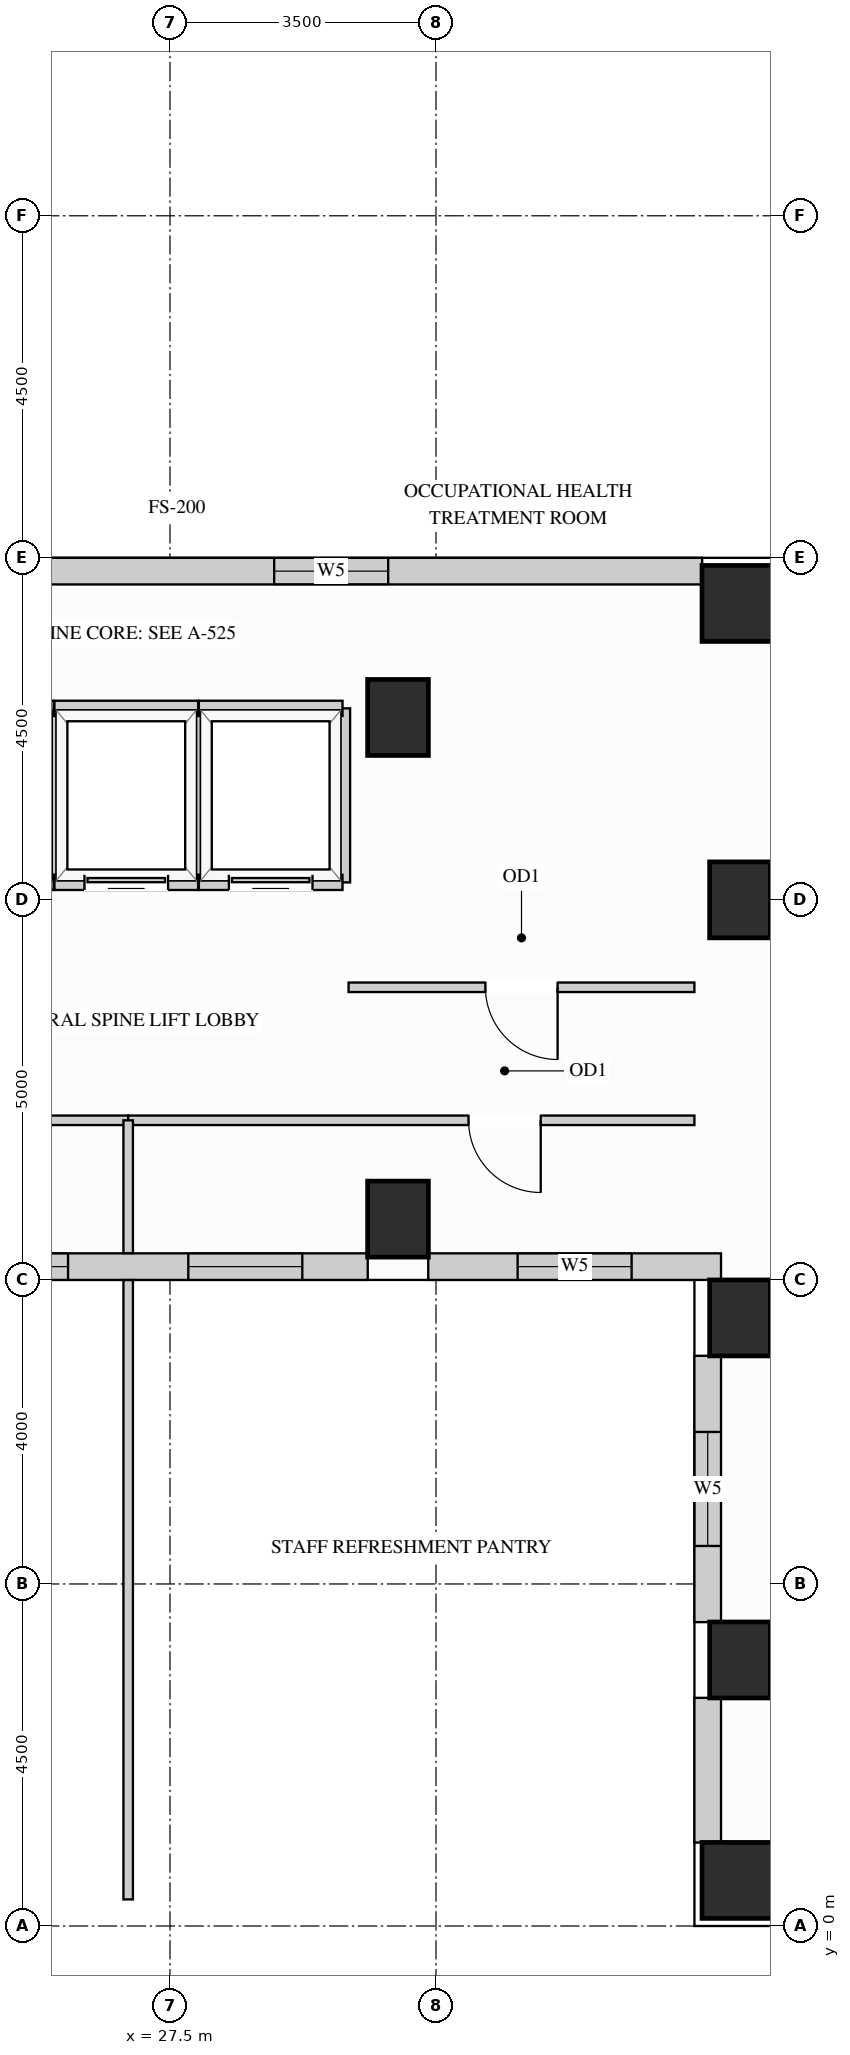
"""IFC4 building model, lengths in metres.
Left out: names, types, materials, properties, quantities, classifications, styles, units other than length and angle.
Written with IfcOpenShell. Run it as: python <this file> out.ifc"""

import sys

from ifc_helpers import new_model, si_unit, direction, frame, frame_2d, origin, origin_2d, place, context, subcontext, project, spatial, rectangle, extrude, source, transform, mapped, element, fill, save


model = new_model("IFC4")
c1 = context("Model", 3, precision=1e-05, world=origin(), true_north=direction((0.0, 1.0)))
c2 = subcontext(c1, "Body", "Model", "MODEL_VIEW")
j1 = project(units=[si_unit("LENGTHUNIT", "METRE"), si_unit("PLANEANGLEUNIT", "RADIAN")], contexts=[c1])
p1 = place(None, origin())
s1 = spatial("IfcSite", under=j1, at=p1, CompositionType="ELEMENT")
p2 = place(p1, origin())
s2 = spatial("IfcBuilding", under=s1, at=p2, CompositionType="ELEMENT")
p3 = place(p2, frame((0.0, 0.0, 157.5)))
s3 = spatial("IfcBuildingStorey", under=s2, at=p3, CompositionType="ELEMENT", Elevation=157.5)
m1 = source(origin(), c2, "Body", "SweptSolid", [
    extrude(rectangle(XDim=0.8, YDim=1.0, at=origin_2d()), origin(), (0.0, 0.0, 1.0), 3.4),
])
for number, where, z_axis, x_axis in (
    (1, (35.0, 13.5, 0.0), (0.0, 0.0, 1.0), (1.0, 0.0, 0.0)),
    (2, (35.0, 3.5, 0.0), (0.0, 0.0, 1.0), (1.0, 0.0, 0.0)),
    (3, (35.0, 8.0, 0.0), (0.0, 0.0, 1.0), (1.0, 0.0, 0.0)),
    (4, (30.5, 15.9, 0.0), (0.0, 0.0, 1.0), (1.0, 0.0, 0.0)),
    (5, (30.5, 9.3, 0.0), (0.0, 0.0, 1.0), (1.0, 0.0, 0.0)),
):
    element("IfcColumn", number, at=place(p3, frame(where, z_axis=z_axis, x_axis=x_axis)), inside=s3, PredefinedType="COLUMN", context=c2, shape_type="MappedRepresentation", body=[
        mapped(m1, transform((0.0, 0.0, 0.0), x_axis=(1.0, 0.0, 0.0), y_axis=(0.0, 1.0, 0.0), z_axis=(0.0, 0.0, 1.0))),
    ])
m2 = source(origin(), c2, "Body", "SweptSolid", [
    extrude(rectangle(XDim=1.0, YDim=1.0, at=origin_2d()), origin(), (0.0, 0.0, 1.0), 3.4),
])
for number, where, z_axis, x_axis in (
    (6, (35.0, 17.4, 0.0), (0.0, 0.0, 1.0), (1.0, 0.0, 0.0)),
    (7, (35.0, 0.6, 0.0), (0.0, 0.0, 1.0), (1.0, 0.0, 0.0)),
):
    element("IfcColumn", number, at=place(p3, frame(where, z_axis=z_axis, x_axis=x_axis)), inside=s3, PredefinedType="COLUMN", context=c2, shape_type="MappedRepresentation", body=[
        mapped(m2, transform((0.0, 0.0, 0.0), x_axis=(1.0, 0.0, 0.0), y_axis=(0.0, 1.0, 0.0), z_axis=(0.0, 0.0, 1.0))),
    ])
p4 = place(p3, frame((23.798, 8.675, 0.0), z_axis=(0.0, 0.0, 1.0), x_axis=(1.0, 0.0, 0.0)))
e8 = element("IfcWall", 8, at=p4, inside=s3, PredefinedType="SOLIDWALL", context=c2, shape_type="SweptSolid", body=[
    extrude(rectangle(XDim=6.304, YDim=0.35, at=frame_2d((3.152, 0.0))), origin(), (0.0, 0.0, 1.0), 3.385),
])
p5 = place(p4, frame((0.861, 0.0, 0.78)))
e9 = element("IfcOpeningElement", 9, at=p5, cuts=e8, PredefinedType="OPENING", context=c2, shape_type="SweptSolid", body=[
    extrude(rectangle(XDim=1.5, YDim=2.0, at=frame_2d((0.75, 1.0))), frame((0.0, 0.185, 0.0), z_axis=(0.0, -1.0, 0.0), x_axis=(1.0, 0.0, 0.0)), (0.0, 0.0, 1.0), 0.37),
])
p6 = place(p4, frame((3.943, 0.0, 0.78)))
e10 = element("IfcOpeningElement", 10, at=p6, cuts=e8, PredefinedType="OPENING", context=c2, shape_type="SweptSolid", body=[
    extrude(rectangle(XDim=1.5, YDim=2.0, at=frame_2d((0.75, 1.0))), frame((0.0, 0.185, 0.0), z_axis=(0.0, -1.0, 0.0), x_axis=(1.0, 0.0, 0.0)), (0.0, 0.0, 1.0), 0.37),
])
p7 = place(p3, frame((30.898, 8.675, 0.0), z_axis=(0.0, 0.0, 1.0), x_axis=(1.0, 0.0, 0.0)))
e11 = element("IfcWall", 11, at=p7, inside=s3, PredefinedType="SOLIDWALL", context=c2, shape_type="SweptSolid", body=[
    extrude(rectangle(XDim=3.852, YDim=0.35, at=frame_2d((1.926, 0.0))), origin(), (0.0, 0.0, 1.0), 3.385),
])
p8 = place(p7, frame((1.176, 0.0, 0.78)))
e12 = element("IfcOpeningElement", 12, at=p8, cuts=e11, PredefinedType="OPENING", context=c2, shape_type="SweptSolid", body=[
    extrude(rectangle(XDim=1.5, YDim=2.0, at=frame_2d((0.75, 1.0))), frame((0.0, 0.185, 0.0), z_axis=(0.0, -1.0, 0.0), x_axis=(1.0, 0.0, 0.0)), (0.0, 0.0, 1.0), 0.37),
])
p9 = place(p3, frame((34.575, 7.502, 0.0), z_axis=(0.0, 0.0, 1.0), x_axis=(0.0, -1.0, 0.0)))
e13 = element("IfcWall", 13, at=p9, inside=s3, PredefinedType="SOLIDWALL", context=c2, shape_type="SweptSolid", body=[
    extrude(rectangle(XDim=3.504, YDim=0.35, at=frame_2d((1.752, 0.0))), origin(), (0.0, 0.0, 1.0), 2.612),
])
p10 = place(p9, frame((1.002, 0.0, 0.78)))
e14 = element("IfcOpeningElement", 14, at=p10, cuts=e13, PredefinedType="OPENING", context=c2, shape_type="SweptSolid", body=[
    extrude(rectangle(XDim=1.5, YDim=1.652, at=frame_2d((0.75, 0.826))), frame((0.0, 0.185, 0.0), z_axis=(0.0, -1.0, 0.0), x_axis=(1.0, 0.0, 0.0)), (0.0, 0.0, 1.0), 0.37),
])
m3 = source(origin(), c2, "Body", "SweptSolid", [
    extrude(rectangle(XDim=1.904, YDim=0.35, at=frame_2d((0.952, 0.0))), origin(), (0.0, 0.0, 1.0), 2.612),
])
p11 = place(p3, frame((34.575, 3.002, 0.0), z_axis=(0.0, 0.0, 1.0), x_axis=(0.0, -1.0, 0.0)))
e15 = element("IfcWall", 15, at=p11, inside=s3, PredefinedType="SOLIDWALL", context=c2, shape_type="MappedRepresentation", body=[
    mapped(m3, transform((0.0, 0.0, 0.0), x_axis=(1.0, 0.0, 0.0), y_axis=(0.0, 1.0, 0.0), z_axis=(0.0, 0.0, 1.0))),
])
p12 = place(p3, frame((34.502, 17.825, 0.0), z_axis=(0.0, 0.0, 1.0), x_axis=(-1.0, 0.0, 0.0)))
e16 = element("IfcWall", 16, at=p12, inside=s3, PredefinedType="SOLIDWALL", context=c2, shape_type="SweptSolid", body=[
    extrude(rectangle(XDim=15.104, YDim=0.35, at=frame_2d((7.552, 0.0))), origin(), (0.0, 0.0, 1.0), 3.385),
])
p13 = place(p12, frame((4.131, 0.0, 0.78)))
e17 = element("IfcOpeningElement", 17, at=p13, cuts=e16, PredefinedType="OPENING", context=c2, shape_type="SweptSolid", body=[
    extrude(rectangle(XDim=1.5, YDim=2.0, at=frame_2d((0.75, 1.0))), frame((0.0, 0.185, 0.0), z_axis=(0.0, -1.0, 0.0), x_axis=(1.0, 0.0, 0.0)), (0.0, 0.0, 1.0), 0.37),
])
p14 = place(p12, frame((9.442, 0.0, 0.78)))
e18 = element("IfcOpeningElement", 18, at=p14, cuts=e16, PredefinedType="OPENING", context=c2, shape_type="SweptSolid", body=[
    extrude(rectangle(XDim=1.5, YDim=2.0, at=frame_2d((0.75, 1.0))), frame((0.0, 0.185, 0.0), z_axis=(0.0, -1.0, 0.0), x_axis=(1.0, 0.0, 0.0)), (0.0, 0.0, 1.0), 0.37),
])
p15 = place(p3, frame((29.85, 12.35, 0.0), z_axis=(0.0, 0.0, 1.0), x_axis=(1.0, 0.0, 0.0)))
e19 = element("IfcWall", 19, at=p15, inside=s3, PredefinedType="PARTITIONING", context=c2, shape_type="SweptSolid", body=[
    extrude(rectangle(XDim=4.55, YDim=0.125, at=frame_2d((2.275, 0.0))), origin(), (0.0, 0.0, 1.0), 3.385),
])
p16 = place(p15, frame((1.8, 0.0, 0.0)))
e20 = element("IfcOpeningElement", 20, at=p16, cuts=e19, PredefinedType="OPENING", context=c2, shape_type="SweptSolid", body=[
    extrude(rectangle(XDim=0.95, YDim=2.15, at=frame_2d((0.475, 1.075))), frame((0.0, 0.073, 0.0), z_axis=(0.0, -1.0, 0.0), x_axis=(1.0, 0.0, 0.0)), (0.0, 0.0, 1.0), 0.145),
])
p17 = place(p3, frame((19.5, 10.6, 0.0), z_axis=(0.0, 0.0, 1.0), x_axis=(1.0, 0.0, 0.0)))
e21 = element("IfcWall", 21, at=p17, inside=s3, PredefinedType="PARTITIONING", context=c2, shape_type="SweptSolid", body=[
    extrude(rectangle(XDim=7.45, YDim=0.125, at=frame_2d((3.725, 0.0))), origin(), (0.0, 0.0, 1.0), 3.385),
])
p18 = place(p17, frame((2.022, 0.0, 0.0)))
e22 = element("IfcOpeningElement", 22, at=p18, cuts=e21, PredefinedType="OPENING", context=c2, shape_type="SweptSolid", body=[
    extrude(rectangle(XDim=0.95, YDim=2.15, at=frame_2d((0.475, 1.075))), frame((0.0, 0.073, 0.0), z_axis=(0.0, -1.0, 0.0), x_axis=(1.0, 0.0, 0.0)), (0.0, 0.0, 1.0), 0.145),
])
p19 = place(p3, frame((26.95, 10.6, 0.0), z_axis=(0.0, 0.0, 1.0), x_axis=(1.0, 0.0, 0.0)))
e23 = element("IfcWall", 23, at=p19, inside=s3, PredefinedType="PARTITIONING", context=c2, shape_type="SweptSolid", body=[
    extrude(rectangle(XDim=7.45, YDim=0.125, at=frame_2d((3.725, 0.0))), origin(), (0.0, 0.0, 1.0), 3.385),
])
p20 = place(p19, frame((4.478, 0.0, 0.0)))
e24 = element("IfcOpeningElement", 24, at=p20, cuts=e23, PredefinedType="OPENING", context=c2, shape_type="SweptSolid", body=[
    extrude(rectangle(XDim=0.95, YDim=2.15, at=frame_2d((0.475, 1.075))), frame((0.0, 0.073, 0.0), z_axis=(0.0, -1.0, 0.0), x_axis=(1.0, 0.0, 0.0)), (0.0, 0.0, 1.0), 0.145),
])
m4 = source(origin(), c2, "Body", "SweptSolid", [
    extrude(rectangle(XDim=8.148, YDim=0.125, at=frame_2d((4.074, 0.0))), origin(), (0.0, 0.0, 1.0), 3.385),
])
p21 = place(p3, frame((26.95, 0.35, 0.0), z_axis=(0.0, 0.0, 1.0), x_axis=(0.0, 1.0, 0.0)))
e25 = element("IfcWall", 25, at=p21, inside=s3, PredefinedType="PARTITIONING", context=c2, shape_type="MappedRepresentation", body=[
    mapped(m4, transform((0.0, 0.0, 0.0), x_axis=(1.0, 0.0, 0.0), y_axis=(0.0, 1.0, 0.0), z_axis=(0.0, 0.0, 1.0))),
])
m5 = source(origin(), c2, "Body", "SweptSolid", [
    extrude(rectangle(XDim=1.748, YDim=0.125, at=frame_2d((0.874, 0.0))), origin(), (0.0, 0.0, 1.0), 3.385),
])
p22 = place(p3, frame((26.95, 8.852, 0.0), z_axis=(0.0, 0.0, 1.0), x_axis=(0.0, 1.0, 0.0)))
e26 = element("IfcWall", 26, at=p22, inside=s3, PredefinedType="PARTITIONING", context=c2, shape_type="MappedRepresentation", body=[
    mapped(m5, transform((0.0, 0.0, 0.0), x_axis=(1.0, 0.0, 0.0), y_axis=(0.0, 1.0, 0.0), z_axis=(0.0, 0.0, 1.0))),
])
m6 = source(origin(), c2, "Body", "SweptSolid", [
    extrude(rectangle(XDim=2.29, YDim=0.2, at=frame_2d((1.145, 0.0))), origin(), (0.0, 0.0, 1.0), 3.385),
])
p23 = place(p3, frame((25.97, 13.73, 0.0), z_axis=(0.0, 0.0, 1.0), x_axis=(0.0, 1.0, 0.0)))
e27 = element("IfcWall", 27, at=p23, inside=s3, PredefinedType="PARTITIONING", context=c2, shape_type="MappedRepresentation", body=[
    mapped(m6, transform((0.0, 0.0, 0.0), x_axis=(1.0, 0.0, 0.0), y_axis=(0.0, 1.0, 0.0), z_axis=(0.0, 0.0, 1.0))),
])
m7 = source(origin(), c2, "Body", "SweptSolid", [
    extrude(rectangle(XDim=1.89, YDim=0.2, at=frame_2d((0.945, 0.0))), origin(), (0.0, 0.0, 1.0), 2.773),
])
p24 = place(p3, frame((24.08, 16.02, 0.0), z_axis=(0.0, 0.0, 1.0), x_axis=(1.0, 0.0, 0.0)))
e28 = element("IfcWall", 28, at=p24, inside=s3, PredefinedType="PARTITIONING", context=c2, shape_type="MappedRepresentation", body=[
    mapped(m7, transform((0.0, 0.0, 0.0), x_axis=(1.0, 0.0, 0.0), y_axis=(0.0, 1.0, 0.0), z_axis=(0.0, 0.0, 1.0))),
])
p25 = place(p3, frame((24.08, 13.73, 0.0), z_axis=(0.0, 0.0, 1.0), x_axis=(1.0, 0.0, 0.0)))
e29 = element("IfcWall", 29, at=p25, inside=s3, PredefinedType="PARTITIONING", context=c2, shape_type="SweptSolid", body=[
    extrude(rectangle(XDim=1.89, YDim=0.2, at=frame_2d((0.945, 0.0))), origin(), (0.0, 0.0, 1.0), 2.466),
])
p26 = place(p25, frame((0.395, 0.0, 0.0)))
e30 = element("IfcOpeningElement", 30, at=p26, cuts=e29, PredefinedType="OPENING", context=c2, shape_type="SweptSolid", body=[
    extrude(rectangle(XDim=1.1, YDim=2.2, at=frame_2d((0.55, 1.1))), frame((0.0, 0.11, 0.0), z_axis=(0.0, -1.0, 0.0), x_axis=(1.0, 0.0, 0.0)), (0.0, 0.0, 1.0), 0.22),
])
p27 = place(p3, frame((27.87, 13.73, 0.0), z_axis=(0.0, 0.0, 1.0), x_axis=(0.0, 1.0, 0.0)))
e31 = element("IfcWall", 31, at=p27, inside=s3, PredefinedType="PARTITIONING", context=c2, shape_type="MappedRepresentation", body=[
    mapped(m6, transform((0.0, 0.0, 0.0), x_axis=(1.0, 0.0, 0.0), y_axis=(0.0, 1.0, 0.0), z_axis=(0.0, 0.0, 1.0))),
])
m8 = source(origin(), c2, "Body", "SweptSolid", [
    extrude(rectangle(XDim=1.89, YDim=0.2, at=frame_2d((0.945, 0.0))), origin(), (0.0, 0.0, 1.0), 2.773),
])
p28 = place(p3, frame((25.98, 16.02, 0.0), z_axis=(0.0, 0.0, 1.0), x_axis=(1.0, 0.0, 0.0)))
e32 = element("IfcWall", 32, at=p28, inside=s3, PredefinedType="PARTITIONING", context=c2, shape_type="MappedRepresentation", body=[
    mapped(m8, transform((0.0, 0.0, 0.0), x_axis=(1.0, 0.0, 0.0), y_axis=(0.0, 1.0, 0.0), z_axis=(0.0, 0.0, 1.0))),
])
p29 = place(p3, frame((25.98, 13.73, 0.0), z_axis=(0.0, 0.0, 1.0), x_axis=(1.0, 0.0, 0.0)))
e33 = element("IfcWall", 33, at=p29, inside=s3, PredefinedType="PARTITIONING", context=c2, shape_type="SweptSolid", body=[
    extrude(rectangle(XDim=1.89, YDim=0.2, at=frame_2d((0.945, 0.0))), origin(), (0.0, 0.0, 1.0), 2.466),
])
p30 = place(p29, frame((0.395, 0.0, 0.0)))
e34 = element("IfcOpeningElement", 34, at=p30, cuts=e33, PredefinedType="OPENING", context=c2, shape_type="SweptSolid", body=[
    extrude(rectangle(XDim=1.1, YDim=2.2, at=frame_2d((0.55, 1.1))), frame((0.0, 0.11, 0.0), z_axis=(0.0, -1.0, 0.0), x_axis=(1.0, 0.0, 0.0)), (0.0, 0.0, 1.0), 0.22),
])
p31 = place(p3, frame((29.77, 13.73, 0.0), z_axis=(0.0, 0.0, 1.0), x_axis=(0.0, 1.0, 0.0)))
e35 = element("IfcWall", 35, at=p31, inside=s3, PredefinedType="PARTITIONING", context=c2, shape_type="MappedRepresentation", body=[
    mapped(m6, transform((0.0, 0.0, 0.0), x_axis=(1.0, 0.0, 0.0), y_axis=(0.0, 1.0, 0.0), z_axis=(0.0, 0.0, 1.0))),
])
p32 = place(p3, frame((27.88, 16.02, 0.0), z_axis=(0.0, 0.0, 1.0), x_axis=(1.0, 0.0, 0.0)))
e36 = element("IfcWall", 36, at=p32, inside=s3, PredefinedType="PARTITIONING", context=c2, shape_type="MappedRepresentation", body=[
    mapped(m8, transform((0.0, 0.0, 0.0), x_axis=(1.0, 0.0, 0.0), y_axis=(0.0, 1.0, 0.0), z_axis=(0.0, 0.0, 1.0))),
])
p33 = place(p3, frame((27.88, 13.73, 0.0), z_axis=(0.0, 0.0, 1.0), x_axis=(1.0, 0.0, 0.0)))
e37 = element("IfcWall", 37, at=p33, inside=s3, PredefinedType="PARTITIONING", context=c2, shape_type="SweptSolid", body=[
    extrude(rectangle(XDim=1.89, YDim=0.2, at=frame_2d((0.945, 0.0))), origin(), (0.0, 0.0, 1.0), 2.466),
])
p34 = place(p33, frame((0.395, 0.0, 0.0)))
e38 = element("IfcOpeningElement", 38, at=p34, cuts=e37, PredefinedType="OPENING", context=c2, shape_type="SweptSolid", body=[
    extrude(rectangle(XDim=1.1, YDim=2.2, at=frame_2d((0.55, 1.1))), frame((0.0, 0.11, 0.0), z_axis=(0.0, -1.0, 0.0), x_axis=(1.0, 0.0, 0.0)), (0.0, 0.0, 1.0), 0.22),
])
m9 = source(origin(), c2, "Body", "SweptSolid", [
    extrude(rectangle(XDim=1.1, YDim=2.2, at=frame_2d((0.55, 1.1))), frame((0.0, 0.025, 0.0), z_axis=(0.0, -1.0, 0.0), x_axis=(1.0, 0.0, 0.0)), (0.0, 0.0, 1.0), 0.05),
])
p35 = place(p30, origin())
e39 = element("IfcDoor", 39, at=p35, inside=s3, OperationType="SLIDING_TO_LEFT", PredefinedType="DOOR", context=c2, shape_type="MappedRepresentation", body=[
    mapped(m9, transform((0.0, 0.0, 0.0), x_axis=(1.0, 0.0, 0.0), y_axis=(0.0, 1.0, 0.0), z_axis=(0.0, 0.0, 1.0))),
])
fill(e34, e39)
p36 = place(p34, origin())
e40 = element("IfcDoor", 40, at=p36, inside=s3, OperationType="SLIDING_TO_LEFT", PredefinedType="DOOR", context=c2, shape_type="MappedRepresentation", body=[
    mapped(m9, transform((0.0, 0.0, 0.0), x_axis=(1.0, 0.0, 0.0), y_axis=(0.0, 1.0, 0.0), z_axis=(0.0, 0.0, 1.0))),
])
fill(e38, e40)
m10 = source(origin(), c2, "Body", "SweptSolid", [
    extrude(rectangle(XDim=0.95, YDim=2.15, at=frame_2d((0.475, 1.075))), frame((0.0, 0.025, 0.0), z_axis=(0.0, -1.0, 0.0), x_axis=(1.0, 0.0, 0.0)), (0.0, 0.0, 1.0), 0.05),
])
p37 = place(p16, origin())
e41 = element("IfcDoor", 41, at=p37, inside=s3, OperationType="SINGLE_SWING_RIGHT", PredefinedType="DOOR", context=c2, shape_type="MappedRepresentation", body=[
    mapped(m10, transform((0.0, 0.0, 0.0), x_axis=(1.0, 0.0, 0.0), y_axis=(0.0, 1.0, 0.0), z_axis=(0.0, 0.0, 1.0))),
])
fill(e20, e41)
p38 = place(p20, origin())
e42 = element("IfcDoor", 42, at=p38, inside=s3, OperationType="SINGLE_SWING_RIGHT", PredefinedType="DOOR", context=c2, shape_type="MappedRepresentation", body=[
    mapped(m10, transform((0.0, 0.0, 0.0), x_axis=(1.0, 0.0, 0.0), y_axis=(0.0, 1.0, 0.0), z_axis=(0.0, 0.0, 1.0))),
])
fill(e24, e42)
m11 = source(origin(), c2, "Body", "SweptSolid", [
    extrude(rectangle(XDim=1.5, YDim=2.0, at=frame_2d((0.75, 1.0))), frame((0.0, 0.03, 0.0), z_axis=(0.0, -1.0, 0.0), x_axis=(1.0, 0.0, 0.0)), (0.0, 0.0, 1.0), 0.06),
])
p39 = place(p5, origin())
e43 = element("IfcWindow", 43, at=p39, inside=s3, PartitioningType="SINGLE_PANEL", PredefinedType="WINDOW", context=c2, shape_type="MappedRepresentation", body=[
    mapped(m11, transform((0.0, 0.0, 0.0), x_axis=(1.0, 0.0, 0.0), y_axis=(0.0, 1.0, 0.0), z_axis=(0.0, 0.0, 1.0))),
])
fill(e9, e43)
p40 = place(p6, origin())
e44 = element("IfcWindow", 44, at=p40, inside=s3, PartitioningType="SINGLE_PANEL", PredefinedType="WINDOW", context=c2, shape_type="MappedRepresentation", body=[
    mapped(m11, transform((0.0, 0.0, 0.0), x_axis=(1.0, 0.0, 0.0), y_axis=(0.0, 1.0, 0.0), z_axis=(0.0, 0.0, 1.0))),
])
fill(e10, e44)
p41 = place(p8, origin())
e45 = element("IfcWindow", 45, at=p41, inside=s3, PartitioningType="SINGLE_PANEL", PredefinedType="WINDOW", context=c2, shape_type="MappedRepresentation", body=[
    mapped(m11, transform((0.0, 0.0, 0.0), x_axis=(1.0, 0.0, 0.0), y_axis=(0.0, 1.0, 0.0), z_axis=(0.0, 0.0, 1.0))),
])
fill(e12, e45)
m12 = source(origin(), c2, "Body", "SweptSolid", [
    extrude(rectangle(XDim=1.5, YDim=1.652, at=frame_2d((0.75, 0.826))), frame((0.0, 0.03, 0.0), z_axis=(0.0, -1.0, 0.0), x_axis=(1.0, 0.0, 0.0)), (0.0, 0.0, 1.0), 0.06),
])
p42 = place(p10, origin())
e46 = element("IfcWindow", 46, at=p42, inside=s3, PartitioningType="SINGLE_PANEL", PredefinedType="WINDOW", context=c2, shape_type="MappedRepresentation", body=[
    mapped(m12, transform((0.0, 0.0, 0.0), x_axis=(1.0, 0.0, 0.0), y_axis=(0.0, 1.0, 0.0), z_axis=(0.0, 0.0, 1.0))),
])
fill(e14, e46)
p43 = place(p13, origin())
e47 = element("IfcWindow", 47, at=p43, inside=s3, PartitioningType="SINGLE_PANEL", PredefinedType="WINDOW", context=c2, shape_type="MappedRepresentation", body=[
    mapped(m11, transform((0.0, 0.0, 0.0), x_axis=(1.0, 0.0, 0.0), y_axis=(0.0, 1.0, 0.0), z_axis=(0.0, 0.0, 1.0))),
])
fill(e17, e47)
save(model, sys.argv[1])
